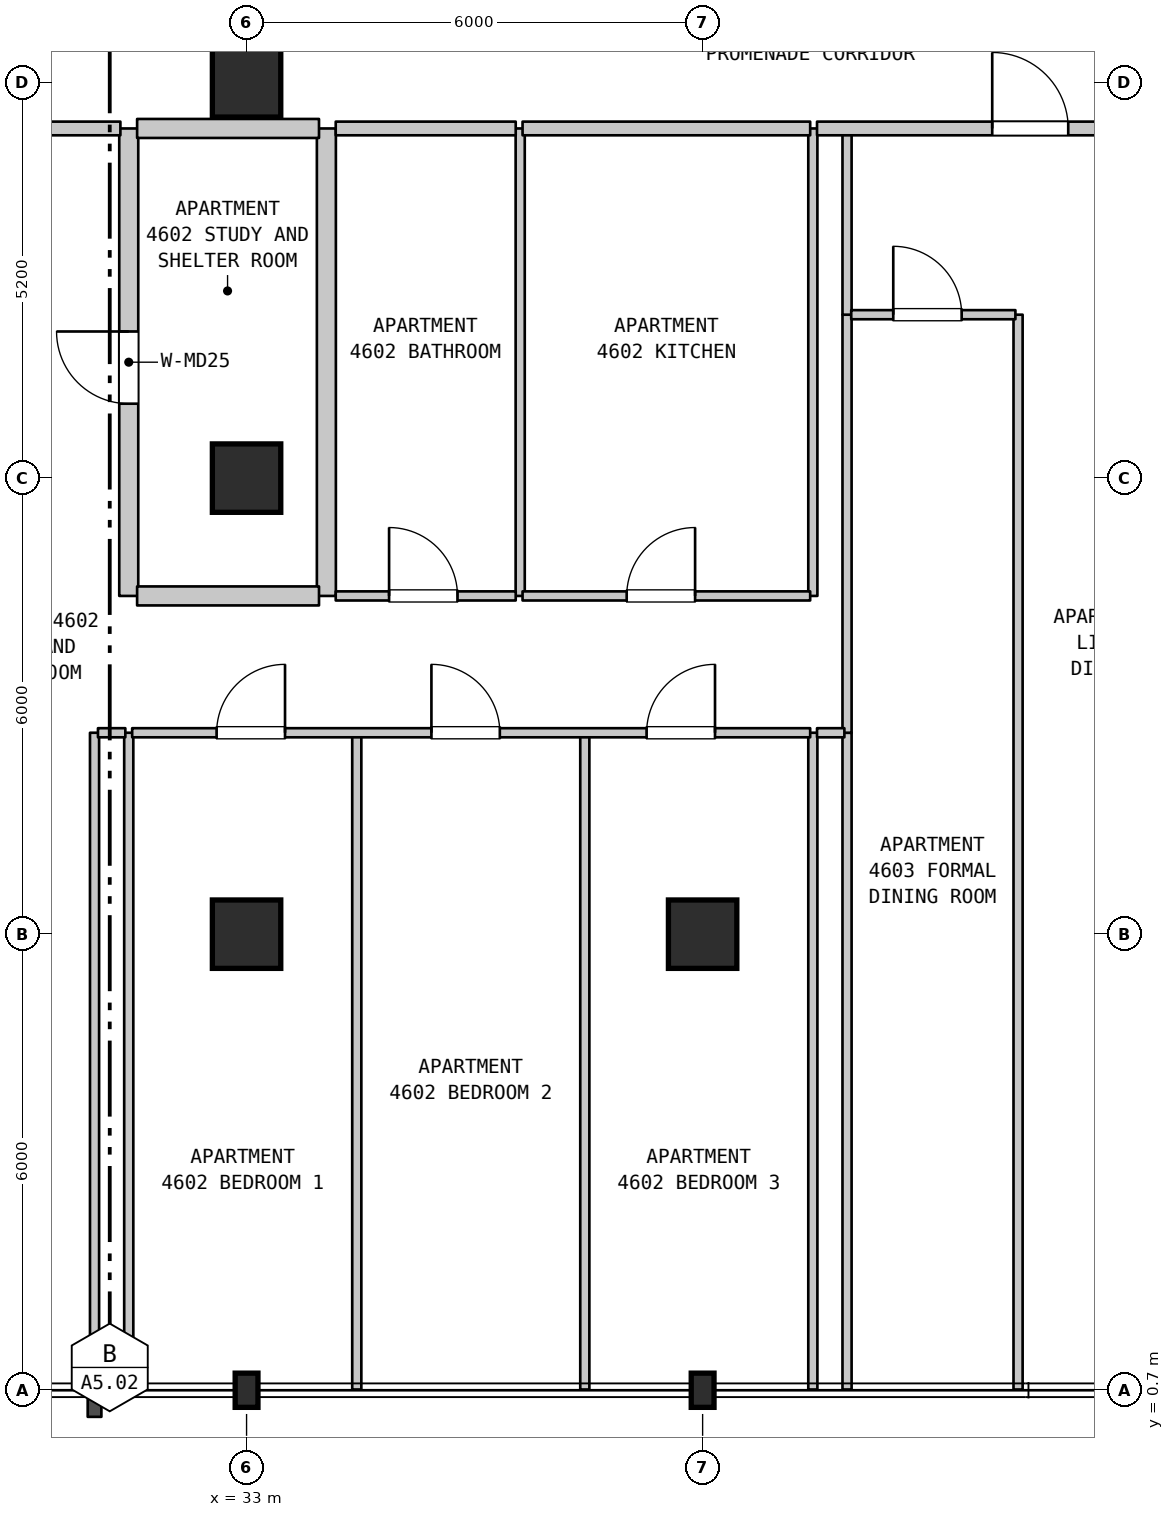
"""IFC4 building model, lengths in metres.
Left out: names, types, materials, properties, quantities, classifications, styles, units other than length and angle.
Written with IfcOpenShell. Run it as: python <this file> out.ifc"""

import sys

from ifc_helpers import new_model, si_unit, direction, frame, frame_2d, origin, origin_2d, place, context, subcontext, project, spatial, rectangle, i_section, extrude, element, fill, save


model = new_model("IFC4")
c1 = context("Model", 3, precision=1e-05, world=origin(), true_north=direction((0.0, 1.0)))
c2 = subcontext(c1, "Body", "Model", "MODEL_VIEW")
j1 = project(units=[si_unit("LENGTHUNIT", "METRE"), si_unit("PLANEANGLEUNIT", "RADIAN")], contexts=[c1])
p1 = place(None, origin())
s1 = spatial("IfcSite", under=j1, at=p1, CompositionType="ELEMENT")
p2 = place(p1, origin())
s2 = spatial("IfcBuilding", under=s1, at=p2, CompositionType="ELEMENT")
p3 = place(p2, frame((0.0, 0.0, 188.4)))
s3 = spatial("IfcBuildingStorey", under=s2, at=p3, CompositionType="ELEMENT", Elevation=188.4)
p4 = place(p3, frame((33.0, 0.7, 0.0), z_axis=(0.0, 0.0, 1.0), x_axis=(1.0, 0.0, 0.0)))
e1 = element("IfcColumn", 1, at=p4, inside=s3, PredefinedType="COLUMN", context=c2, shape_type="SweptSolid", body=[
    extrude(i_section(OverallWidth=0.3, OverallDepth=0.45, WebThickness=0.014, FlangeThickness=0.026, FilletRadius=0.027, at=origin_2d()), origin(), (0.0, 0.0, 1.0), 3.7),
])
for number, where, z_axis, x_axis in (
    (2, (33.0, 6.7, 0.0), (0.0, 0.0, 1.0), (1.0, 0.0, 0.0)),
    (3, (33.0, 12.7, 0.0), (0.0, 0.0, 1.0), (1.0, 0.0, 0.0)),
    (4, (33.0, 17.9, 0.0), (0.0, 0.0, 1.0), (1.0, 0.0, 0.0)),
):
    element("IfcColumn", number, at=place(p3, frame(where, z_axis=z_axis, x_axis=x_axis)), inside=s3, PredefinedType="COLUMN", context=c2, shape_type="SweptSolid", body=[
        extrude(rectangle(XDim=0.9, YDim=0.9, at=origin_2d()), origin(), (0.0, 0.0, 1.0), 3.7),
    ])
p5 = place(p3, frame((39.0, 0.7, 0.0), z_axis=(0.0, 0.0, 1.0), x_axis=(1.0, 0.0, 0.0)))
e5 = element("IfcColumn", 5, at=p5, inside=s3, PredefinedType="COLUMN", context=c2, shape_type="SweptSolid", body=[
    extrude(i_section(OverallWidth=0.3, OverallDepth=0.45, WebThickness=0.014, FlangeThickness=0.026, FilletRadius=0.027, at=origin_2d()), origin(), (0.0, 0.0, 1.0), 3.7),
])
p6 = place(p3, frame((39.0, 6.7, 0.0), z_axis=(0.0, 0.0, 1.0), x_axis=(1.0, 0.0, 0.0)))
e6 = element("IfcColumn", 6, at=p6, inside=s3, PredefinedType="COLUMN", context=c2, shape_type="SweptSolid", body=[
    extrude(rectangle(XDim=0.9, YDim=0.9, at=origin_2d()), origin(), (0.0, 0.0, 1.0), 3.7),
])
for number, where, z_axis, x_axis in (
    (7, (31.0, 0.71, 0.0), (0.0, 0.0, 1.0), (0.0, 1.0, 0.0)),
    (8, (31.45, 0.71, 0.0), (0.0, 0.0, 1.0), (0.0, 1.0, 0.0)),
):
    element("IfcWall", number, at=place(p3, frame(where, z_axis=z_axis, x_axis=x_axis)), inside=s3, PredefinedType="PARTITIONING", context=c2, shape_type="SweptSolid", body=[
        extrude(rectangle(XDim=8.64, YDim=0.12, at=frame_2d((4.32, 0.0))), origin(), (0.0, 0.0, 1.0), 3.39),
    ])
p7 = place(p3, frame((31.45, 11.15, 0.0), z_axis=(0.0, 0.0, 1.0), x_axis=(0.0, 1.0, 0.0)))
e9 = element("IfcWall", 9, at=p7, inside=s3, PredefinedType="STANDARD", context=c2, shape_type="SweptSolid", body=[
    extrude(rectangle(XDim=6.15, YDim=0.25, at=frame_2d((3.075, 0.0))), origin(), (0.0, 0.0, 1.0), 3.39),
])
p8 = place(p7, frame((2.529, 0.0, 0.0)))
e10 = element("IfcOpeningElement", 10, at=p8, cuts=e9, PredefinedType="OPENING", context=c2, shape_type="SweptSolid", body=[
    extrude(rectangle(XDim=0.95, YDim=2.15, at=frame_2d((0.475, 1.075))), frame((0.0, 0.135, 0.0), z_axis=(0.0, -1.0, 0.0), x_axis=(1.0, 0.0, 0.0)), (0.0, 0.0, 1.0), 0.27),
])
p9 = place(p3, frame((34.05, 11.15, 0.0), z_axis=(0.0, 0.0, 1.0), x_axis=(0.0, 1.0, 0.0)))
e11 = element("IfcWall", 11, at=p9, inside=s3, PredefinedType="STANDARD", context=c2, shape_type="SweptSolid", body=[
    extrude(rectangle(XDim=6.15, YDim=0.25, at=frame_2d((3.075, 0.0))), origin(), (0.0, 0.0, 1.0), 3.39),
])
p10 = place(p3, frame((34.45, 0.71, 0.0), z_axis=(0.0, 0.0, 1.0), x_axis=(0.0, 1.0, 0.0)))
e12 = element("IfcWall", 12, at=p10, inside=s3, PredefinedType="PARTITIONING", context=c2, shape_type="SweptSolid", body=[
    extrude(rectangle(XDim=8.64, YDim=0.12, at=frame_2d((4.32, 0.0))), origin(), (0.0, 0.0, 1.0), 3.39),
])
p11 = place(p3, frame((36.6, 11.15, 0.0), z_axis=(0.0, 0.0, 1.0), x_axis=(0.0, 1.0, 0.0)))
e13 = element("IfcWall", 13, at=p11, inside=s3, PredefinedType="PARTITIONING", context=c2, shape_type="SweptSolid", body=[
    extrude(rectangle(XDim=6.15, YDim=0.12, at=frame_2d((3.075, 0.0))), origin(), (0.0, 0.0, 1.0), 3.39),
])
for number, where, z_axis, x_axis in (
    (14, (37.45, 0.71, 0.0), (0.0, 0.0, 1.0), (0.0, 1.0, 0.0)),
    (15, (40.45, 0.71, 0.0), (0.0, 0.0, 1.0), (0.0, 1.0, 0.0)),
):
    element("IfcWall", number, at=place(p3, frame(where, z_axis=z_axis, x_axis=x_axis)), inside=s3, PredefinedType="PARTITIONING", context=c2, shape_type="SweptSolid", body=[
        extrude(rectangle(XDim=8.64, YDim=0.12, at=frame_2d((4.32, 0.0))), origin(), (0.0, 0.0, 1.0), 3.39),
    ])
p12 = place(p3, frame((40.45, 11.15, 0.0), z_axis=(0.0, 0.0, 1.0), x_axis=(0.0, 1.0, 0.0)))
e16 = element("IfcWall", 16, at=p12, inside=s3, PredefinedType="PARTITIONING", context=c2, shape_type="SweptSolid", body=[
    extrude(rectangle(XDim=6.15, YDim=0.12, at=frame_2d((3.075, 0.0))), origin(), (0.0, 0.0, 1.0), 3.39),
])
p13 = place(p3, frame((40.9, 0.71, 0.0), z_axis=(0.0, 0.0, 1.0), x_axis=(0.0, 1.0, 0.0)))
e17 = element("IfcWall", 17, at=p13, inside=s3, PredefinedType="PARTITIONING", context=c2, shape_type="SweptSolid", body=[
    extrude(rectangle(XDim=8.64, YDim=0.12, at=frame_2d((4.32, 0.0))), origin(), (0.0, 0.0, 1.0), 3.39),
])
p14 = place(p3, frame((40.9, 9.35, 0.0), z_axis=(0.0, 0.0, 1.0), x_axis=(0.0, 1.0, 0.0)))
e18 = element("IfcWall", 18, at=p14, inside=s3, PredefinedType="PARTITIONING", context=c2, shape_type="SweptSolid", body=[
    extrude(rectangle(XDim=5.5, YDim=0.12, at=frame_2d((2.75, 0.0))), origin(), (0.0, 0.0, 1.0), 3.39),
])
p15 = place(p3, frame((40.9, 14.85, 0.0), z_axis=(0.0, 0.0, 1.0), x_axis=(0.0, 1.0, 0.0)))
e19 = element("IfcWall", 19, at=p15, inside=s3, PredefinedType="PARTITIONING", context=c2, shape_type="SweptSolid", body=[
    extrude(rectangle(XDim=2.45, YDim=0.12, at=frame_2d((1.225, 0.0))), origin(), (0.0, 0.0, 1.0), 3.39),
])
p16 = place(p3, frame((43.15, 0.71, 0.0), z_axis=(0.0, 0.0, 1.0), x_axis=(0.0, 1.0, 0.0)))
e20 = element("IfcWall", 20, at=p16, inside=s3, PredefinedType="PARTITIONING", context=c2, shape_type="SweptSolid", body=[
    extrude(rectangle(XDim=14.14, YDim=0.12, at=frame_2d((7.07, 0.0))), origin(), (0.0, 0.0, 1.0), 3.39),
])
p17 = place(p3, frame((31.045, 9.35, 0.0), z_axis=(0.0, 0.0, 1.0), x_axis=(1.0, 0.0, 0.0)))
e21 = element("IfcWall", 21, at=p17, inside=s3, PredefinedType="PARTITIONING", context=c2, shape_type="SweptSolid", body=[
    extrude(rectangle(XDim=0.36, YDim=0.12, at=frame_2d((0.18, 0.0))), origin(), (0.0, 0.0, 1.0), 3.39),
])
p18 = place(p3, frame((31.495, 9.35, 0.0), z_axis=(0.0, 0.0, 1.0), x_axis=(1.0, 0.0, 0.0)))
e22 = element("IfcWall", 22, at=p18, inside=s3, PredefinedType="PARTITIONING", context=c2, shape_type="SweptSolid", body=[
    extrude(rectangle(XDim=8.92, YDim=0.12, at=frame_2d((4.46, 0.0))), origin(), (0.0, 0.0, 1.0), 3.39),
])
p19 = place(p18, frame((1.111, 0.0, 0.0)))
e23 = element("IfcOpeningElement", 23, at=p19, cuts=e22, PredefinedType="OPENING", context=c2, shape_type="SweptSolid", body=[
    extrude(rectangle(XDim=0.9, YDim=2.15, at=frame_2d((0.45, 1.075))), frame((0.0, 0.07, 0.0), z_axis=(0.0, -1.0, 0.0), x_axis=(1.0, 0.0, 0.0)), (0.0, 0.0, 1.0), 0.14),
])
p20 = place(p18, frame((3.937, 0.0, 0.0)))
e24 = element("IfcOpeningElement", 24, at=p20, cuts=e22, PredefinedType="OPENING", context=c2, shape_type="SweptSolid", body=[
    extrude(rectangle(XDim=0.9, YDim=2.15, at=frame_2d((0.45, 1.075))), frame((0.0, 0.07, 0.0), z_axis=(0.0, -1.0, 0.0), x_axis=(1.0, 0.0, 0.0)), (0.0, 0.0, 1.0), 0.14),
])
p21 = place(p18, frame((6.768, 0.0, 0.0)))
e25 = element("IfcOpeningElement", 25, at=p21, cuts=e22, PredefinedType="OPENING", context=c2, shape_type="SweptSolid", body=[
    extrude(rectangle(XDim=0.9, YDim=2.15, at=frame_2d((0.45, 1.075))), frame((0.0, 0.07, 0.0), z_axis=(0.0, -1.0, 0.0), x_axis=(1.0, 0.0, 0.0)), (0.0, 0.0, 1.0), 0.14),
])
p22 = place(p3, frame((40.505, 9.35, 0.0), z_axis=(0.0, 0.0, 1.0), x_axis=(1.0, 0.0, 0.0)))
e26 = element("IfcWall", 26, at=p22, inside=s3, PredefinedType="PARTITIONING", context=c2, shape_type="SweptSolid", body=[
    extrude(rectangle(XDim=0.36, YDim=0.12, at=frame_2d((0.18, 0.0))), origin(), (0.0, 0.0, 1.0), 3.39),
])
p23 = place(p3, frame((31.56, 11.15, 0.0), z_axis=(0.0, 0.0, 1.0), x_axis=(1.0, 0.0, 0.0)))
e27 = element("IfcWall", 27, at=p23, inside=s3, PredefinedType="STANDARD", context=c2, shape_type="SweptSolid", body=[
    extrude(rectangle(XDim=2.393, YDim=0.25, at=frame_2d((1.196, 0.0))), origin(), (0.0, 0.0, 1.0), 3.39),
])
p24 = place(p3, frame((34.173, 11.15, 0.0), z_axis=(0.0, 0.0, 1.0), x_axis=(1.0, 0.0, 0.0)))
e28 = element("IfcWall", 28, at=p24, inside=s3, PredefinedType="PARTITIONING", context=c2, shape_type="SweptSolid", body=[
    extrude(rectangle(XDim=2.368, YDim=0.12, at=frame_2d((1.184, 0.0))), origin(), (0.0, 0.0, 1.0), 3.39),
])
p25 = place(p24, frame((0.702, 0.0, 0.0)))
e29 = element("IfcOpeningElement", 29, at=p25, cuts=e28, PredefinedType="OPENING", context=c2, shape_type="SweptSolid", body=[
    extrude(rectangle(XDim=0.9, YDim=2.1, at=frame_2d((0.45, 1.05))), frame((0.0, 0.07, 0.0), z_axis=(0.0, -1.0, 0.0), x_axis=(1.0, 0.0, 0.0)), (0.0, 0.0, 1.0), 0.14),
])
p26 = place(p3, frame((36.631, 11.15, 0.0), z_axis=(0.0, 0.0, 1.0), x_axis=(1.0, 0.0, 0.0)))
e30 = element("IfcWall", 30, at=p26, inside=s3, PredefinedType="PARTITIONING", context=c2, shape_type="SweptSolid", body=[
    extrude(rectangle(XDim=3.784, YDim=0.12, at=frame_2d((1.892, 0.0))), origin(), (0.0, 0.0, 1.0), 3.39),
])
p27 = place(p26, frame((1.37, 0.0, 0.0)))
e31 = element("IfcOpeningElement", 31, at=p27, cuts=e30, PredefinedType="OPENING", context=c2, shape_type="SweptSolid", body=[
    extrude(rectangle(XDim=0.9, YDim=2.15, at=frame_2d((0.45, 1.075))), frame((0.0, 0.07, 0.0), z_axis=(0.0, -1.0, 0.0), x_axis=(1.0, 0.0, 0.0)), (0.0, 0.0, 1.0), 0.14),
])
p28 = place(p3, frame((40.955, 14.85, 0.0), z_axis=(0.0, 0.0, 1.0), x_axis=(1.0, 0.0, 0.0)))
e32 = element("IfcWall", 32, at=p28, inside=s3, PredefinedType="PARTITIONING", context=c2, shape_type="SweptSolid", body=[
    extrude(rectangle(XDim=2.16, YDim=0.12, at=frame_2d((1.08, 0.0))), origin(), (0.0, 0.0, 1.0), 3.39),
])
p29 = place(p28, frame((0.553, 0.0, 0.0)))
e33 = element("IfcOpeningElement", 33, at=p29, cuts=e32, PredefinedType="OPENING", context=c2, shape_type="SweptSolid", body=[
    extrude(rectangle(XDim=0.9, YDim=2.15, at=frame_2d((0.45, 1.075))), frame((0.0, 0.07, 0.0), z_axis=(0.0, -1.0, 0.0), x_axis=(1.0, 0.0, 0.0)), (0.0, 0.0, 1.0), 0.14),
])
p30 = place(p3, frame((26.245, 17.3, 0.0), z_axis=(0.0, 0.0, 1.0), x_axis=(1.0, 0.0, 0.0)))
e34 = element("IfcWall", 34, at=p30, inside=s3, PredefinedType="STANDARD", context=c2, shape_type="SweptSolid", body=[
    extrude(rectangle(XDim=5.095, YDim=0.18, at=frame_2d((2.547, 0.0))), origin(), (0.0, 0.0, 1.0), 3.39),
])
p31 = place(p30, frame((2.08, 0.0, 0.0)))
e35 = element("IfcOpeningElement", 35, at=p31, cuts=e34, PredefinedType="OPENING", context=c2, shape_type="SweptSolid", body=[
    extrude(rectangle(XDim=1.0, YDim=2.15, at=frame_2d((0.5, 1.075))), frame((0.0, 0.1, 0.0), z_axis=(0.0, -1.0, 0.0), x_axis=(1.0, 0.0, 0.0)), (0.0, 0.0, 1.0), 0.2),
])
p32 = place(p3, frame((31.56, 17.3, 0.0), z_axis=(0.0, 0.0, 1.0), x_axis=(1.0, 0.0, 0.0)))
e36 = element("IfcWall", 36, at=p32, inside=s3, PredefinedType="STANDARD", context=c2, shape_type="SweptSolid", body=[
    extrude(rectangle(XDim=2.393, YDim=0.25, at=frame_2d((1.196, 0.0))), origin(), (0.0, 0.0, 1.0), 3.39),
])
p33 = place(p3, frame((34.173, 17.3, 0.0), z_axis=(0.0, 0.0, 1.0), x_axis=(1.0, 0.0, 0.0)))
e37 = element("IfcWall", 37, at=p33, inside=s3, PredefinedType="STANDARD", context=c2, shape_type="SweptSolid", body=[
    extrude(rectangle(XDim=2.368, YDim=0.18, at=frame_2d((1.184, 0.0))), origin(), (0.0, 0.0, 1.0), 3.39),
])
p34 = place(p3, frame((36.631, 17.3, 0.0), z_axis=(0.0, 0.0, 1.0), x_axis=(1.0, 0.0, 0.0)))
e38 = element("IfcWall", 38, at=p34, inside=s3, PredefinedType="STANDARD", context=c2, shape_type="SweptSolid", body=[
    extrude(rectangle(XDim=3.784, YDim=0.18, at=frame_2d((1.892, 0.0))), origin(), (0.0, 0.0, 1.0), 3.39),
])
p35 = place(p3, frame((40.505, 17.3, 0.0), z_axis=(0.0, 0.0, 1.0), x_axis=(1.0, 0.0, 0.0)))
e39 = element("IfcWall", 39, at=p35, inside=s3, PredefinedType="STANDARD", context=c2, shape_type="SweptSolid", body=[
    extrude(rectangle(XDim=5.545, YDim=0.18, at=frame_2d((2.772, 0.0))), origin(), (0.0, 0.0, 1.0), 3.39),
])
p36 = place(p35, frame((2.305, 0.0, 0.0)))
e40 = element("IfcOpeningElement", 40, at=p36, cuts=e39, PredefinedType="OPENING", context=c2, shape_type="SweptSolid", body=[
    extrude(rectangle(XDim=1.0, YDim=2.15, at=frame_2d((0.5, 1.075))), frame((0.0, 0.1, 0.0), z_axis=(0.0, -1.0, 0.0), x_axis=(1.0, 0.0, 0.0)), (0.0, 0.0, 1.0), 0.2),
])
p37 = place(p8, origin())
e41 = element("IfcDoor", 41, at=p37, inside=s3, OperationType="SINGLE_SWING_RIGHT", PredefinedType="DOOR", context=c2, shape_type="SweptSolid", body=[
    extrude(rectangle(XDim=0.95, YDim=2.15, at=frame_2d((0.475, 1.075))), frame((0.0, 0.025, 0.0), z_axis=(0.0, -1.0, 0.0), x_axis=(1.0, 0.0, 0.0)), (0.0, 0.0, 1.0), 0.05),
])
fill(e10, e41)
p38 = place(p19, origin())
e42 = element("IfcDoor", 42, at=p38, inside=s3, OperationType="SINGLE_SWING_RIGHT", PredefinedType="DOOR", context=c2, shape_type="SweptSolid", body=[
    extrude(rectangle(XDim=0.9, YDim=2.15, at=frame_2d((0.45, 1.075))), frame((0.0, 0.025, 0.0), z_axis=(0.0, -1.0, 0.0), x_axis=(1.0, 0.0, 0.0)), (0.0, 0.0, 1.0), 0.05),
])
fill(e23, e42)
p39 = place(p20, origin())
e43 = element("IfcDoor", 43, at=p39, inside=s3, OperationType="SINGLE_SWING_LEFT", PredefinedType="DOOR", context=c2, shape_type="SweptSolid", body=[
    extrude(rectangle(XDim=0.9, YDim=2.15, at=frame_2d((0.45, 1.075))), frame((0.0, 0.025, 0.0), z_axis=(0.0, -1.0, 0.0), x_axis=(1.0, 0.0, 0.0)), (0.0, 0.0, 1.0), 0.05),
])
fill(e24, e43)
p40 = place(p21, origin())
e44 = element("IfcDoor", 44, at=p40, inside=s3, OperationType="SINGLE_SWING_RIGHT", PredefinedType="DOOR", context=c2, shape_type="SweptSolid", body=[
    extrude(rectangle(XDim=0.9, YDim=2.15, at=frame_2d((0.45, 1.075))), frame((0.0, 0.025, 0.0), z_axis=(0.0, -1.0, 0.0), x_axis=(1.0, 0.0, 0.0)), (0.0, 0.0, 1.0), 0.05),
])
fill(e25, e44)
p41 = place(p25, origin())
e45 = element("IfcDoor", 45, at=p41, inside=s3, OperationType="SINGLE_SWING_LEFT", PredefinedType="DOOR", context=c2, shape_type="SweptSolid", body=[
    extrude(rectangle(XDim=0.9, YDim=2.1, at=frame_2d((0.45, 1.05))), frame((0.0, 0.025, 0.0), z_axis=(0.0, -1.0, 0.0), x_axis=(1.0, 0.0, 0.0)), (0.0, 0.0, 1.0), 0.05),
])
fill(e29, e45)
p42 = place(p27, origin())
e46 = element("IfcDoor", 46, at=p42, inside=s3, OperationType="SINGLE_SWING_RIGHT", PredefinedType="DOOR", context=c2, shape_type="SweptSolid", body=[
    extrude(rectangle(XDim=0.9, YDim=2.15, at=frame_2d((0.45, 1.075))), frame((0.0, 0.025, 0.0), z_axis=(0.0, -1.0, 0.0), x_axis=(1.0, 0.0, 0.0)), (0.0, 0.0, 1.0), 0.05),
])
fill(e31, e46)
p43 = place(p29, origin())
e47 = element("IfcDoor", 47, at=p43, inside=s3, OperationType="SINGLE_SWING_LEFT", PredefinedType="DOOR", context=c2, shape_type="SweptSolid", body=[
    extrude(rectangle(XDim=0.9, YDim=2.15, at=frame_2d((0.45, 1.075))), frame((0.0, 0.025, 0.0), z_axis=(0.0, -1.0, 0.0), x_axis=(1.0, 0.0, 0.0)), (0.0, 0.0, 1.0), 0.05),
])
fill(e33, e47)
p44 = place(p36, origin())
e48 = element("IfcDoor", 48, at=p44, inside=s3, OperationType="SINGLE_SWING_LEFT", PredefinedType="DOOR", context=c2, shape_type="SweptSolid", body=[
    extrude(rectangle(XDim=1.0, YDim=2.15, at=frame_2d((0.5, 1.075))), frame((0.0, 0.025, 0.0), z_axis=(0.0, -1.0, 0.0), x_axis=(1.0, 0.0, 0.0)), (0.0, 0.0, 1.0), 0.05),
])
fill(e40, e48)
save(model, sys.argv[1])
